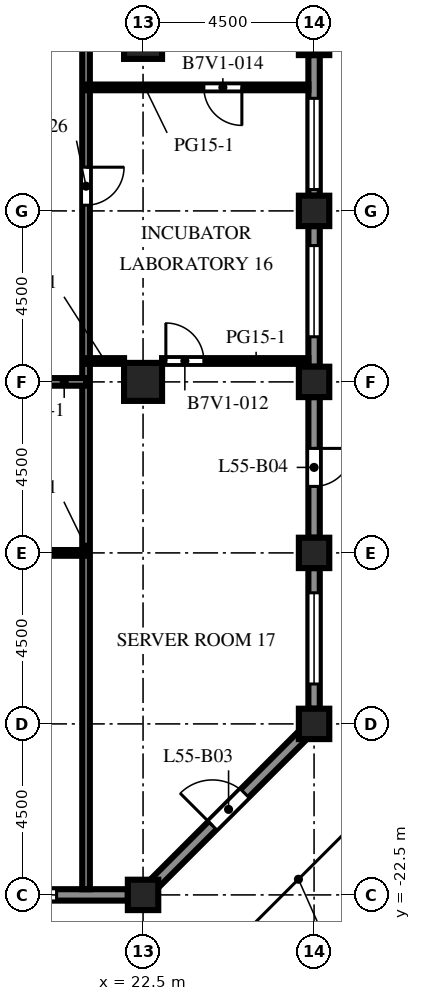
"""IFC4 building model, lengths in metres.
Left out: names, types, materials, properties, quantities, classifications, styles, units other than length and angle.
Written with IfcOpenShell. Run it as: python <this file> out.ifc"""

import sys

from ifc_helpers import new_model, si_unit, direction, frame, frame_2d, origin, origin_2d, place, context, subcontext, project, spatial, rectangle, extrude, element, fill, save


model = new_model("IFC4")
c1 = context("Model", 3, precision=1e-05, world=origin(), true_north=direction((0.0, 1.0)))
c2 = subcontext(c1, "Body", "Model", "MODEL_VIEW")
j1 = project(units=[si_unit("LENGTHUNIT", "METRE"), si_unit("PLANEANGLEUNIT", "RADIAN")], contexts=[c1])
p1 = place(None, origin())
s1 = spatial("IfcSite", under=j1, at=p1, CompositionType="ELEMENT")
p2 = place(p1, origin())
s2 = spatial("IfcBuilding", under=s1, at=p2, CompositionType="ELEMENT")
p3 = place(p2, frame((0.0, 0.0, 243.9)))
s3 = spatial("IfcBuildingStorey", under=s2, at=p3, CompositionType="ELEMENT", Elevation=243.9)
for number, where, z_axis, x_axis in (
    (1, (22.5, -22.5, 0.0), (0.0, 0.0, 1.0), (1.0, 0.0, 0.0)),
    (2, (27.0, -18.0, 0.0), (0.0, 0.0, 1.0), (1.0, 0.0, 0.0)),
    (3, (27.0, -13.5, 0.0), (0.0, 0.0, 1.0), (1.0, 0.0, 0.0)),
    (4, (27.0, -9.0, 0.0), (0.0, 0.0, 1.0), (1.0, 0.0, 0.0)),
    (5, (27.0, -4.5, 0.0), (0.0, 0.0, 1.0), (1.0, 0.0, 0.0)),
    (6, (27.0, 0.0, 0.0), (0.0, 0.0, 1.0), (1.0, 0.0, 0.0)),
):
    element("IfcColumn", number, at=place(p3, frame(where, z_axis=z_axis, x_axis=x_axis)), inside=s3, PredefinedType="COLUMN", context=c2, shape_type="SweptSolid", body=[
        extrude(rectangle(XDim=0.8, YDim=0.8, at=origin_2d()), origin(), (0.0, 0.0, 1.0), 4.1),
    ])
for number, where, z_axis, x_axis in (
    (7, (22.5, -9.0, 0.0), (0.0, 0.0, 1.0), (1.0, 0.0, 0.0)),
    (8, (22.5, 0.0, 0.0), (0.0, 0.0, 1.0), (1.0, 0.0, 0.0)),
):
    element("IfcColumn", number, at=place(p3, frame(where, z_axis=z_axis, x_axis=x_axis)), inside=s3, PredefinedType="COLUMN", context=c2, shape_type="SweptSolid", body=[
        extrude(rectangle(XDim=1.0, YDim=1.0, at=origin_2d()), origin(), (0.0, 0.0, 1.0), 4.1),
    ])
p4 = place(p3, frame((22.1, -22.5, 0.0), z_axis=(0.0, 0.0, 1.0), x_axis=(-1.0, 0.0, 0.0)))
e9 = element("IfcWall", 9, at=p4, inside=s3, PredefinedType="SOLIDWALL", context=c2, shape_type="SweptSolid", body=[
    extrude(rectangle(XDim=3.7, YDim=0.3, at=frame_2d((1.85, 0.0))), origin(), (0.0, 0.0, 1.0), 2.85),
])
p5 = place(p4, frame((1.875, 0.0, 0.8)))
e10 = element("IfcOpeningElement", 10, at=p5, cuts=e9, PredefinedType="OPENING", context=c2, shape_type="SweptSolid", body=[
    extrude(rectangle(XDim=1.2, YDim=1.7, at=frame_2d((0.6, 0.85))), frame((0.0, 0.16, 0.0), z_axis=(0.0, -1.0, 0.0), x_axis=(1.0, 0.0, 0.0)), (0.0, 0.0, 1.0), 0.32),
])
p6 = place(p3, frame((26.706, -18.294, 0.0), z_axis=(0.0, 0.0, 1.0), x_axis=(-0.707106781187, -0.707106781187, 0.0)))
e11 = element("IfcWall", 11, at=p6, inside=s3, PredefinedType="SOLIDWALL", context=c2, shape_type="SweptSolid", body=[
    extrude(rectangle(XDim=5.532, YDim=0.3, at=frame_2d((2.766, 0.0))), origin(), (0.0, 0.0, 1.0), 2.85),
])
p7 = place(p6, frame((2.166, 0.0, 0.0)))
e12 = element("IfcOpeningElement", 12, at=p7, cuts=e11, PredefinedType="OPENING", context=c2, shape_type="SweptSolid", body=[
    extrude(rectangle(XDim=1.2, YDim=2.2, at=frame_2d((0.6, 1.1))), frame((0.0, 0.16, 0.0), z_axis=(0.0, -1.0, 0.0), x_axis=(1.0, 0.0, 0.0)), (0.0, 0.0, 1.0), 0.32),
])
p8 = place(p3, frame((27.0, -13.9, 0.0), z_axis=(0.0, 0.0, 1.0), x_axis=(0.0, -1.0, 0.0)))
e13 = element("IfcWall", 13, at=p8, inside=s3, PredefinedType="SOLIDWALL", context=c2, shape_type="SweptSolid", body=[
    extrude(rectangle(XDim=3.7, YDim=0.3, at=frame_2d((1.85, 0.0))), origin(), (0.0, 0.0, 1.0), 2.85),
])
p9 = place(p8, frame((0.65, 0.0, 0.8)))
e14 = element("IfcOpeningElement", 14, at=p9, cuts=e13, PredefinedType="OPENING", context=c2, shape_type="SweptSolid", body=[
    extrude(rectangle(XDim=2.4, YDim=1.7, at=frame_2d((1.2, 0.85))), frame((0.0, 0.16, 0.0), z_axis=(0.0, -1.0, 0.0), x_axis=(1.0, 0.0, 0.0)), (0.0, 0.0, 1.0), 0.32),
])
p10 = place(p3, frame((27.0, -9.4, 0.0), z_axis=(0.0, 0.0, 1.0), x_axis=(0.0, -1.0, 0.0)))
e15 = element("IfcWall", 15, at=p10, inside=s3, PredefinedType="SOLIDWALL", context=c2, shape_type="SweptSolid", body=[
    extrude(rectangle(XDim=3.7, YDim=0.3, at=frame_2d((1.85, 0.0))), origin(), (0.0, 0.0, 1.0), 2.85),
])
p11 = place(p10, frame((1.35, 0.0, 0.0)))
e16 = element("IfcOpeningElement", 16, at=p11, cuts=e15, PredefinedType="OPENING", context=c2, shape_type="SweptSolid", body=[
    extrude(rectangle(XDim=1.0, YDim=2.2, at=frame_2d((0.5, 1.1))), frame((0.0, 0.16, 0.0), z_axis=(0.0, -1.0, 0.0), x_axis=(1.0, 0.0, 0.0)), (0.0, 0.0, 1.0), 0.32),
])
p12 = place(p3, frame((27.0, -4.9, 0.0), z_axis=(0.0, 0.0, 1.0), x_axis=(0.0, -1.0, 0.0)))
e17 = element("IfcWall", 17, at=p12, inside=s3, PredefinedType="SOLIDWALL", context=c2, shape_type="SweptSolid", body=[
    extrude(rectangle(XDim=3.7, YDim=0.3, at=frame_2d((1.85, 0.0))), origin(), (0.0, 0.0, 1.0), 2.85),
])
p13 = place(p12, frame((0.512, 0.0, 0.8)))
e18 = element("IfcOpeningElement", 18, at=p13, cuts=e17, PredefinedType="OPENING", context=c2, shape_type="SweptSolid", body=[
    extrude(rectangle(XDim=2.4, YDim=1.7, at=frame_2d((1.2, 0.85))), frame((0.0, 0.16, 0.0), z_axis=(0.0, -1.0, 0.0), x_axis=(1.0, 0.0, 0.0)), (0.0, 0.0, 1.0), 0.32),
])
p14 = place(p3, frame((27.0, -0.4, 0.0), z_axis=(0.0, 0.0, 1.0), x_axis=(0.0, -1.0, 0.0)))
e19 = element("IfcWall", 19, at=p14, inside=s3, PredefinedType="SOLIDWALL", context=c2, shape_type="SweptSolid", body=[
    extrude(rectangle(XDim=3.7, YDim=0.3, at=frame_2d((1.85, 0.0))), origin(), (0.0, 0.0, 1.0), 2.85),
])
p15 = place(p14, frame((1.137, 0.0, 0.8)))
e20 = element("IfcOpeningElement", 20, at=p15, cuts=e19, PredefinedType="OPENING", context=c2, shape_type="SweptSolid", body=[
    extrude(rectangle(XDim=2.4, YDim=1.7, at=frame_2d((1.2, 0.85))), frame((0.0, 0.16, 0.0), z_axis=(0.0, -1.0, 0.0), x_axis=(1.0, 0.0, 0.0)), (0.0, 0.0, 1.0), 0.32),
])
p16 = place(p3, frame((21.0, 3.25, 0.0), z_axis=(0.0, 0.0, 1.0), x_axis=(0.0, -1.0, 0.0)))
e21 = element("IfcWall", 21, at=p16, inside=s3, PredefinedType="PARTITIONING", context=c2, shape_type="SweptSolid", body=[
    extrude(rectangle(XDim=25.6, YDim=0.2, at=frame_2d((12.8, 0.0))), origin(), (0.0, 0.0, 1.0), 3.65),
])
p17 = place(p16, frame((6.6, 0.0, 0.0)))
e22 = element("IfcOpeningElement", 22, at=p17, cuts=e21, PredefinedType="OPENING", context=c2, shape_type="SweptSolid", body=[
    extrude(rectangle(XDim=1.0, YDim=2.1, at=frame_2d((0.5, 1.05))), frame((0.0, 0.11, 0.0), z_axis=(0.0, -1.0, 0.0), x_axis=(1.0, 0.0, 0.0)), (0.0, 0.0, 1.0), 0.22),
])
p18 = place(p3, frame((21.0, -13.5, 0.0), z_axis=(0.0, 0.0, 1.0), x_axis=(-1.0, 0.0, 0.0)))
e23 = element("IfcWall", 23, at=p18, inside=s3, PredefinedType="PARTITIONING", context=c2, shape_type="SweptSolid", body=[
    extrude(rectangle(XDim=34.5, YDim=0.15, at=frame_2d((17.25, 0.0))), origin(), (0.0, 0.0, 1.0), 3.65),
])
p19 = place(p18, frame((31.65, 0.0, 0.0)))
e24 = element("IfcOpeningElement", 24, at=p19, cuts=e23, PredefinedType="OPENING", context=c2, shape_type="SweptSolid", body=[
    extrude(rectangle(XDim=1.0, YDim=2.1, at=frame_2d((0.5, 1.05))), frame((0.0, 0.085, 0.0), z_axis=(0.0, -1.0, 0.0), x_axis=(1.0, 0.0, 0.0)), (0.0, 0.0, 1.0), 0.17),
])
p20 = place(p18, frame((22.15, 0.0, 0.0)))
e25 = element("IfcOpeningElement", 25, at=p20, cuts=e23, PredefinedType="OPENING", context=c2, shape_type="SweptSolid", body=[
    extrude(rectangle(XDim=1.0, YDim=2.1, at=frame_2d((0.5, 1.05))), frame((0.0, 0.085, 0.0), z_axis=(0.0, -1.0, 0.0), x_axis=(1.0, 0.0, 0.0)), (0.0, 0.0, 1.0), 0.17),
])
p21 = place(p18, frame((13.15, 0.0, 0.0)))
e26 = element("IfcOpeningElement", 26, at=p21, cuts=e23, PredefinedType="OPENING", context=c2, shape_type="SweptSolid", body=[
    extrude(rectangle(XDim=1.0, YDim=2.1, at=frame_2d((0.5, 1.05))), frame((0.0, 0.085, 0.0), z_axis=(0.0, -1.0, 0.0), x_axis=(1.0, 0.0, 0.0)), (0.0, 0.0, 1.0), 0.17),
])
p22 = place(p18, frame((6.15, 0.0, 0.0)))
e27 = element("IfcOpeningElement", 27, at=p22, cuts=e23, PredefinedType="OPENING", context=c2, shape_type="SweptSolid", body=[
    extrude(rectangle(XDim=1.0, YDim=2.1, at=frame_2d((0.5, 1.05))), frame((0.0, 0.085, 0.0), z_axis=(0.0, -1.0, 0.0), x_axis=(1.0, 0.0, 0.0)), (0.0, 0.0, 1.0), 0.17),
])
p23 = place(p3, frame((21.0, -9.0, 0.0), z_axis=(0.0, 0.0, 1.0), x_axis=(-1.0, 0.0, 0.0)))
e28 = element("IfcWall", 28, at=p23, inside=s3, PredefinedType="PARTITIONING", context=c2, shape_type="SweptSolid", body=[
    extrude(rectangle(XDim=3.0, YDim=0.2, at=frame_2d((1.5, 0.0))), origin(), (0.0, 0.0, 1.0), 3.65),
])
p24 = place(p23, frame((1.15, 0.0, 0.0)))
e29 = element("IfcOpeningElement", 29, at=p24, cuts=e28, PredefinedType="OPENING", context=c2, shape_type="SweptSolid", body=[
    extrude(rectangle(XDim=1.0, YDim=2.1, at=frame_2d((0.5, 1.05))), frame((0.0, 0.11, 0.0), z_axis=(0.0, -1.0, 0.0), x_axis=(1.0, 0.0, 0.0)), (0.0, 0.0, 1.0), 0.22),
])
p25 = place(p3, frame((21.0, -8.45, 0.0), z_axis=(0.0, 0.0, 1.0), x_axis=(1.0, 0.0, 0.0)))
e30 = element("IfcWall", 30, at=p25, inside=s3, PredefinedType="PARTITIONING", context=c2, shape_type="SweptSolid", body=[
    extrude(rectangle(XDim=1.0, YDim=0.15, at=frame_2d((0.5, 0.0))), origin(), (0.0, 0.0, 1.0), 3.65),
])
p26 = place(p3, frame((26.85, -8.45, 0.0), z_axis=(0.0, 0.0, 1.0), x_axis=(-1.0, 0.0, 0.0)))
e31 = element("IfcWall", 31, at=p26, inside=s3, PredefinedType="PARTITIONING", context=c2, shape_type="SweptSolid", body=[
    extrude(rectangle(XDim=3.85, YDim=0.15, at=frame_2d((1.925, 0.0))), origin(), (0.0, 0.0, 1.0), 3.65),
])
p27 = place(p26, frame((2.75, 0.0, 0.0)))
e32 = element("IfcOpeningElement", 32, at=p27, cuts=e31, PredefinedType="OPENING", context=c2, shape_type="SweptSolid", body=[
    extrude(rectangle(XDim=1.0, YDim=2.1, at=frame_2d((0.5, 1.05))), frame((0.0, 0.085, 0.0), z_axis=(0.0, -1.0, 0.0), x_axis=(1.0, 0.0, 0.0)), (0.0, 0.0, 1.0), 0.17),
])
p28 = place(p3, frame((21.0, -1.25, 0.0), z_axis=(0.0, 0.0, 1.0), x_axis=(1.0, 0.0, 0.0)))
e33 = element("IfcWall", 33, at=p28, inside=s3, PredefinedType="PARTITIONING", context=c2, shape_type="SweptSolid", body=[
    extrude(rectangle(XDim=5.85, YDim=0.15, at=frame_2d((2.925, 0.0))), origin(), (0.0, 0.0, 1.0), 3.65),
])
p29 = place(p28, frame((3.1, 0.0, 0.0)))
e34 = element("IfcOpeningElement", 34, at=p29, cuts=e33, PredefinedType="OPENING", context=c2, shape_type="SweptSolid", body=[
    extrude(rectangle(XDim=1.0, YDim=2.1, at=frame_2d((0.5, 1.05))), frame((0.0, 0.085, 0.0), z_axis=(0.0, -1.0, 0.0), x_axis=(1.0, 0.0, 0.0)), (0.0, 0.0, 1.0), 0.17),
])
p30 = place(p5, origin())
e35 = element("IfcWindow", 35, at=p30, inside=s3, PartitioningType="SINGLE_PANEL", PredefinedType="WINDOW", context=c2, shape_type="SweptSolid", body=[
    extrude(rectangle(XDim=1.2, YDim=1.7, at=frame_2d((0.6, 0.85))), frame((0.0, 0.03, 0.0), z_axis=(0.0, -1.0, 0.0), x_axis=(1.0, 0.0, 0.0)), (0.0, 0.0, 1.0), 0.06),
])
fill(e10, e35)
p31 = place(p7, origin())
e36 = element("IfcDoor", 36, at=p31, inside=s3, OperationType="SINGLE_SWING_RIGHT", PredefinedType="DOOR", context=c2, shape_type="SweptSolid", body=[
    extrude(rectangle(XDim=1.2, YDim=2.2, at=frame_2d((0.6, 1.1))), frame((0.0, 0.025, 0.0), z_axis=(0.0, -1.0, 0.0), x_axis=(1.0, 0.0, 0.0)), (0.0, 0.0, 1.0), 0.05),
])
fill(e12, e36)
p32 = place(p9, origin())
e37 = element("IfcWindow", 37, at=p32, inside=s3, PartitioningType="SINGLE_PANEL", PredefinedType="WINDOW", context=c2, shape_type="SweptSolid", body=[
    extrude(rectangle(XDim=2.4, YDim=1.7, at=frame_2d((1.2, 0.85))), frame((0.0, 0.03, 0.0), z_axis=(0.0, -1.0, 0.0), x_axis=(1.0, 0.0, 0.0)), (0.0, 0.0, 1.0), 0.06),
])
fill(e14, e37)
p33 = place(p11, origin())
e38 = element("IfcDoor", 38, at=p33, inside=s3, OperationType="SINGLE_SWING_LEFT", PredefinedType="DOOR", context=c2, shape_type="SweptSolid", body=[
    extrude(rectangle(XDim=1.0, YDim=2.2, at=frame_2d((0.5, 1.1))), frame((0.0, 0.025, 0.0), z_axis=(0.0, -1.0, 0.0), x_axis=(1.0, 0.0, 0.0)), (0.0, 0.0, 1.0), 0.05),
])
fill(e16, e38)
p34 = place(p13, origin())
e39 = element("IfcWindow", 39, at=p34, inside=s3, PartitioningType="SINGLE_PANEL", PredefinedType="WINDOW", context=c2, shape_type="SweptSolid", body=[
    extrude(rectangle(XDim=2.4, YDim=1.7, at=frame_2d((1.2, 0.85))), frame((0.0, 0.03, 0.0), z_axis=(0.0, -1.0, 0.0), x_axis=(1.0, 0.0, 0.0)), (0.0, 0.0, 1.0), 0.06),
])
fill(e18, e39)
p35 = place(p15, origin())
e40 = element("IfcWindow", 40, at=p35, inside=s3, PartitioningType="SINGLE_PANEL", PredefinedType="WINDOW", context=c2, shape_type="SweptSolid", body=[
    extrude(rectangle(XDim=2.4, YDim=1.7, at=frame_2d((1.2, 0.85))), frame((0.0, 0.03, 0.0), z_axis=(0.0, -1.0, 0.0), x_axis=(1.0, 0.0, 0.0)), (0.0, 0.0, 1.0), 0.06),
])
fill(e20, e40)
p36 = place(p27, origin())
e41 = element("IfcDoor", 41, at=p36, inside=s3, OperationType="SINGLE_SWING_RIGHT", PredefinedType="DOOR", context=c2, shape_type="SweptSolid", body=[
    extrude(rectangle(XDim=1.0, YDim=2.1, at=frame_2d((0.5, 1.05))), frame((0.0, 0.025, 0.0), z_axis=(0.0, -1.0, 0.0), x_axis=(1.0, 0.0, 0.0)), (0.0, 0.0, 1.0), 0.05),
])
fill(e32, e41)
p37 = place(p29, origin())
e42 = element("IfcDoor", 42, at=p37, inside=s3, OperationType="SINGLE_SWING_RIGHT", PredefinedType="DOOR", context=c2, shape_type="SweptSolid", body=[
    extrude(rectangle(XDim=1.0, YDim=2.1, at=frame_2d((0.5, 1.05))), frame((0.0, 0.025, 0.0), z_axis=(0.0, -1.0, 0.0), x_axis=(1.0, 0.0, 0.0)), (0.0, 0.0, 1.0), 0.05),
])
fill(e34, e42)
p38 = place(p17, origin())
e43 = element("IfcDoor", 43, at=p38, inside=s3, OperationType="SINGLE_SWING_LEFT", PredefinedType="DOOR", context=c2, shape_type="SweptSolid", body=[
    extrude(rectangle(XDim=1.0, YDim=2.1, at=frame_2d((0.5, 1.05))), frame((0.0, 0.025, 0.0), z_axis=(0.0, -1.0, 0.0), x_axis=(1.0, 0.0, 0.0)), (0.0, 0.0, 1.0), 0.05),
])
fill(e22, e43)
save(model, sys.argv[1])
